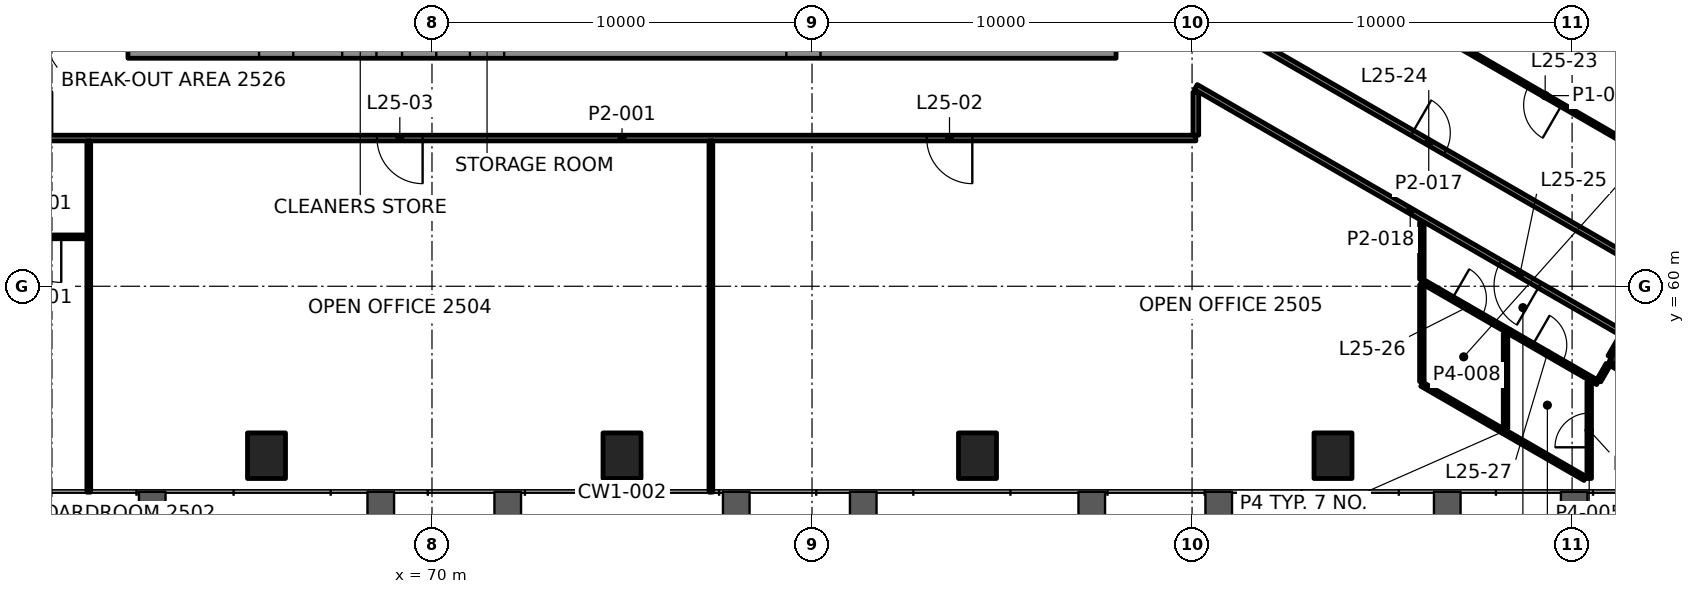
"""IFC4 building model, lengths in metres.
Left out: names, types, materials, properties, quantities, classifications, styles, units other than length and angle.
Written with IfcOpenShell. Run it as: python <this file> out.ifc"""

import sys

from ifc_helpers import new_model, si_unit, direction, frame, frame_2d, origin, origin_2d, place, context, subcontext, project, spatial, rectangle, extrude, element, fill, save


model = new_model("IFC4")
c1 = context("Model", 3, precision=1e-05, world=origin(), true_north=direction((0.0, 1.0)))
c2 = subcontext(c1, "Body", "Model", "MODEL_VIEW")
j1 = project(units=[si_unit("LENGTHUNIT", "METRE"), si_unit("PLANEANGLEUNIT", "RADIAN")], contexts=[c1])
p1 = place(None, origin())
s1 = spatial("IfcSite", under=j1, at=p1, CompositionType="ELEMENT")
p2 = place(p1, origin())
s2 = spatial("IfcBuilding", under=s1, at=p2, CompositionType="ELEMENT")
p3 = place(p2, frame((0.0, 0.0, 111.4)))
s3 = spatial("IfcBuildingStorey", under=s2, at=p3, CompositionType="ELEMENT", Elevation=111.4)
p4 = place(p3, frame((103.304, 58.659, 0.0), z_axis=(0.0, 0.0, 1.0), x_axis=(0.5, 0.866025403784, 0.0)))
e1 = element("IfcColumn", 1, at=p4, inside=s3, PredefinedType="COLUMN", context=c2, shape_type="SweptSolid", body=[
    extrude(rectangle(XDim=3.4, YDim=3.4, at=origin_2d()), origin(), (0.0, 0.0, 1.0), 4.2),
])
for number, where, z_axis, x_axis in (
    (2, (65.646, 55.541, -0.0), (0.0, 0.0, 1.0), (1.0, 0.0, 0.0)),
    (3, (75.0, 55.541, -0.0), (0.0, 0.0, 1.0), (1.0, 0.0, 0.0)),
    (4, (84.354, 55.541, -0.0), (0.0, 0.0, 1.0), (1.0, 0.0, 0.0)),
    (5, (93.708, 55.541, -0.0), (0.0, 0.0, 1.0), (1.0, 0.0, 0.0)),
):
    element("IfcColumn", number, at=place(p3, frame(where, z_axis=z_axis, x_axis=x_axis)), inside=s3, PredefinedType="COLUMN", context=c2, shape_type="SweptSolid", body=[
        extrude(rectangle(XDim=1.0, YDim=1.2, at=origin_2d()), origin(), (0.0, 0.0, 1.0), 4.2),
    ])
p5 = place(p3, frame((62.0, 66.45, 0.0), z_axis=(0.0, 0.0, 1.0), x_axis=(1.0, 0.0, 0.0)))
e6 = element("IfcWall", 6, at=p5, inside=s3, PredefinedType="SHEAR", context=c2, shape_type="SweptSolid", body=[
    extrude(rectangle(XDim=26.0, YDim=0.9, at=frame_2d((13.0, 0.0))), origin(), (0.0, 0.0, 1.0), 4.0),
])
p6 = place(p5, frame((3.45, 0.0, 0.0)))
e7 = element("IfcOpeningElement", 7, at=p6, cuts=e6, PredefinedType="OPENING", context=c2, shape_type="SweptSolid", body=[
    extrude(rectangle(XDim=0.9, YDim=2.1, at=frame_2d((0.45, 1.05))), frame((0.0, 0.46, 0.0), z_axis=(0.0, -1.0, 0.0), x_axis=(1.0, 0.0, 0.0)), (0.0, 0.0, 1.0), 0.92),
])
p7 = place(p5, frame((5.637, 0.0, 0.0)))
e8 = element("IfcOpeningElement", 8, at=p7, cuts=e6, PredefinedType="OPENING", context=c2, shape_type="SweptSolid", body=[
    extrude(rectangle(XDim=0.9, YDim=2.1, at=frame_2d((0.45, 1.05))), frame((0.0, 0.46, 0.0), z_axis=(0.0, -1.0, 0.0), x_axis=(1.0, 0.0, 0.0)), (0.0, 0.0, 1.0), 0.92),
])
p8 = place(p5, frame((7.212, 0.0, 0.0)))
e9 = element("IfcOpeningElement", 9, at=p8, cuts=e6, PredefinedType="OPENING", context=c2, shape_type="SweptSolid", body=[
    extrude(rectangle(XDim=0.9, YDim=2.1, at=frame_2d((0.45, 1.05))), frame((0.0, 0.46, 0.0), z_axis=(0.0, -1.0, 0.0), x_axis=(1.0, 0.0, 0.0)), (0.0, 0.0, 1.0), 0.92),
])
p9 = place(p5, frame((8.999, 0.0, 0.0)))
e10 = element("IfcOpeningElement", 10, at=p9, cuts=e6, PredefinedType="OPENING", context=c2, shape_type="SweptSolid", body=[
    extrude(rectangle(XDim=0.9, YDim=2.1, at=frame_2d((0.45, 1.05))), frame((0.0, 0.46, 0.0), z_axis=(0.0, -1.0, 0.0), x_axis=(1.0, 0.0, 0.0)), (0.0, 0.0, 1.0), 0.92),
])
p10 = place(p5, frame((17.324, 0.0, 0.0)))
e11 = element("IfcOpeningElement", 11, at=p10, cuts=e6, PredefinedType="OPENING", context=c2, shape_type="SweptSolid", body=[
    extrude(rectangle(XDim=0.9, YDim=2.1, at=frame_2d((0.45, 1.05))), frame((0.0, 0.46, 0.0), z_axis=(0.0, -1.0, 0.0), x_axis=(1.0, 0.0, 0.0)), (0.0, 0.0, 1.0), 0.92),
])
p11 = place(p3, frame((60.919, 61.3, 0.0), z_axis=(0.0, 0.0, 1.0), x_axis=(-1.0, 0.0, 0.0)))
e12 = element("IfcWall", 12, at=p11, inside=s3, PredefinedType="PARTITIONING", context=c2, shape_type="SweptSolid", body=[
    extrude(rectangle(XDim=2.548, YDim=0.1, at=frame_2d((1.274, 0.0))), origin(), (0.0, 0.0, 1.0), 3.4),
])
p12 = place(p11, frame((0.674, 0.0, 0.0)))
e13 = element("IfcOpeningElement", 13, at=p12, cuts=e12, PredefinedType="OPENING", context=c2, shape_type="SweptSolid", body=[
    extrude(rectangle(XDim=1.2, YDim=2.1, at=frame_2d((0.6, 1.05))), frame((0.0, 0.06, 0.0), z_axis=(0.0, -1.0, 0.0), x_axis=(1.0, 0.0, 0.0)), (0.0, 0.0, 1.0), 0.12),
])
p13 = place(p3, frame((90.099, 63.9, 0.0), z_axis=(0.0, 0.0, 1.0), x_axis=(-1.0, 0.0, 0.0)))
e14 = element("IfcWall", 14, at=p13, inside=s3, PredefinedType="PARTITIONING", context=c2, shape_type="SweptSolid", body=[
    extrude(rectangle(XDim=30.199, YDim=0.15, at=frame_2d((15.099, 0.0))), origin(), (0.0, 0.0, 1.0), 3.4),
])
p14 = place(p13, frame((5.882, 0.0, 0.0)))
e15 = element("IfcOpeningElement", 15, at=p14, cuts=e14, PredefinedType="OPENING", context=c2, shape_type="SweptSolid", body=[
    extrude(rectangle(XDim=1.2, YDim=2.1, at=frame_2d((0.6, 1.05))), frame((0.0, 0.085, 0.0), z_axis=(0.0, -1.0, 0.0), x_axis=(1.0, 0.0, 0.0)), (0.0, 0.0, 1.0), 0.17),
])
p15 = place(p13, frame((20.346, 0.0, 0.0)))
e16 = element("IfcOpeningElement", 16, at=p15, cuts=e14, PredefinedType="OPENING", context=c2, shape_type="SweptSolid", body=[
    extrude(rectangle(XDim=1.2, YDim=2.1, at=frame_2d((0.6, 1.05))), frame((0.0, 0.085, 0.0), z_axis=(0.0, -1.0, 0.0), x_axis=(1.0, 0.0, 0.0)), (0.0, 0.0, 1.0), 0.17),
])
p16 = place(p3, frame((100.704, 57.516, 0.0), z_axis=(0.0, 0.0, 1.0), x_axis=(0.499679281737, 0.866210491395, 0.0)))
e17 = element("IfcWall", 17, at=p16, inside=s3, PredefinedType="PARTITIONING", context=c2, shape_type="SweptSolid", body=[
    extrude(rectangle(XDim=0.49, YDim=0.12, at=frame_2d((0.245, 0.0))), origin(), (0.0, 0.0, 1.0), 3.4),
])
p17 = place(p3, frame((101.031, 58.124, 0.0), z_axis=(0.0, 0.0, 1.0), x_axis=(0.500049599607, 0.865996765544, 0.0)))
e18 = element("IfcWall", 18, at=p17, inside=s3, PredefinedType="PARTITIONING", context=c2, shape_type="SweptSolid", body=[
    extrude(rectangle(XDim=0.625, YDim=0.2, at=frame_2d((0.312, 0.0))), origin(), (0.0, 0.0, 1.0), 3.4),
])
p18 = place(p3, frame((100.45, 54.941, 0.0), z_axis=(0.0, 0.0, 1.0), x_axis=(0.0, 1.0, 0.0)))
e19 = element("IfcWall", 19, at=p18, inside=s3, PredefinedType="PARTITIONING", context=c2, shape_type="SweptSolid", body=[
    extrude(rectangle(XDim=2.542, YDim=0.12, at=frame_2d((1.271, 0.0))), origin(), (0.0, 0.0, 1.0), 3.4),
])
p19 = place(p18, frame((0.821, 0.0, 0.0)))
e20 = element("IfcOpeningElement", 20, at=p19, cuts=e19, PredefinedType="OPENING", context=c2, shape_type="SweptSolid", body=[
    extrude(rectangle(XDim=0.9, YDim=2.1, at=frame_2d((0.45, 1.05))), frame((0.0, 0.07, 0.0), z_axis=(0.0, -1.0, 0.0), x_axis=(1.0, 0.0, 0.0)), (0.0, 0.0, 1.0), 0.14),
])
p20 = place(p3, frame((98.249, 56.26, 0.0), z_axis=(0.0, 0.0, 1.0), x_axis=(0.0, 1.0, 0.0)))
e21 = element("IfcWall", 21, at=p20, inside=s3, PredefinedType="PARTITIONING", context=c2, shape_type="SweptSolid", body=[
    extrude(rectangle(XDim=2.495, YDim=0.12, at=frame_2d((1.248, 0.0))), origin(), (0.0, 0.0, 1.0), 3.4),
])
p21 = place(p3, frame((96.047, 57.491, 0.0), z_axis=(0.0, 0.0, 1.0), x_axis=(0.0, 1.0, 0.0)))
e22 = element("IfcWall", 22, at=p21, inside=s3, PredefinedType="PARTITIONING", context=c2, shape_type="SweptSolid", body=[
    extrude(rectangle(XDim=2.541, YDim=0.12, at=frame_2d((1.27, 0.0))), origin(), (0.0, 0.0, 1.0), 3.4),
])
p22 = place(p3, frame((90.1, 63.976, 0.0), z_axis=(0.0, 0.0, 1.0), x_axis=(0.0, 1.0, 0.0)))
e23 = element("IfcWall", 23, at=p22, inside=s3, PredefinedType="PARTITIONING", context=c2, shape_type="SweptSolid", body=[
    extrude(rectangle(XDim=1.131, YDim=0.15, at=frame_2d((0.565, 0.0))), origin(), (0.0, 0.0, 1.0), 3.247),
])
for number, where, z_axis, x_axis in (
    (24, (77.339, 54.581, 0.0), (0.0, 0.0, 1.0), (0.0, 1.0, 0.0)),
    (25, (60.969, 54.581, 0.0), (0.0, 0.0, 1.0), (0.0, 1.0, 0.0)),
):
    element("IfcWall", number, at=place(p3, frame(where, z_axis=z_axis, x_axis=x_axis)), inside=s3, PredefinedType="PARTITIONING", context=c2, shape_type="SweptSolid", body=[
        extrude(rectangle(XDim=9.244, YDim=0.1, at=frame_2d((4.622, 0.0))), origin(), (0.0, 0.0, 1.0), 3.165),
    ])
p23 = place(p3, frame((105.833, 61.24, 0.0), z_axis=(0.0, 0.0, 1.0), x_axis=(-0.866025727262, 0.499999439721, 0.0)))
e26 = element("IfcWall", 26, at=p23, inside=s3, PredefinedType="PARTITIONING", context=c2, shape_type="SweptSolid", body=[
    extrude(rectangle(XDim=15.107, YDim=0.1, at=frame_2d((7.553, 0.0))), origin(), (0.0, 0.0, 1.0), 3.4),
])
p24 = place(p23, frame((7.053, 0.0, 0.0)))
e27 = element("IfcOpeningElement", 27, at=p24, cuts=e26, PredefinedType="OPENING", context=c2, shape_type="SweptSolid", body=[
    extrude(rectangle(XDim=1.0, YDim=2.1, at=frame_2d((0.5, 1.05))), frame((0.0, 0.06, 0.0), z_axis=(0.0, -1.0, 0.0), x_axis=(1.0, 0.0, 0.0)), (0.0, 0.0, 1.0), 0.12),
])
p25 = place(p3, frame((90.175, 67.278, 0.0), z_axis=(0.0, 0.0, 1.0), x_axis=(0.866025916507, -0.499999111938, 0.0)))
e28 = element("IfcWall", 28, at=p25, inside=s3, PredefinedType="PARTITIONING", context=c2, shape_type="SweptSolid", body=[
    extrude(rectangle(XDim=13.979, YDim=0.15, at=frame_2d((6.99, 0.0))), origin(), (0.0, 0.0, 1.0), 3.4),
])
p26 = place(p25, frame((6.49, 0.0, 0.0)))
e29 = element("IfcOpeningElement", 29, at=p26, cuts=e28, PredefinedType="OPENING", context=c2, shape_type="SweptSolid", body=[
    extrude(rectangle(XDim=1.0, YDim=2.1, at=frame_2d((0.5, 1.05))), frame((0.0, 0.085, 0.0), z_axis=(0.0, -1.0, 0.0), x_axis=(1.0, 0.0, 0.0)), (0.0, 0.0, 1.0), 0.17),
])
p27 = place(p3, frame((101.382, 58.729, 0.0), z_axis=(0.0, 0.0, 1.0), x_axis=(-0.866023606965, 0.500003112169, 0.0)))
e30 = element("IfcWall", 30, at=p27, inside=s3, PredefinedType="PARTITIONING", context=c2, shape_type="SweptSolid", body=[
    extrude(rectangle(XDim=13.027, YDim=0.15, at=frame_2d((6.513, 0.0))), origin(), (0.0, 0.0, 1.0), 3.247),
])
p28 = place(p27, frame((2.581, 0.0, 0.0)))
e31 = element("IfcOpeningElement", 31, at=p28, cuts=e30, PredefinedType="OPENING", context=c2, shape_type="SweptSolid", body=[
    extrude(rectangle(XDim=1.2, YDim=2.1, at=frame_2d((0.6, 1.05))), frame((0.0, 0.085, 0.0), z_axis=(0.0, -1.0, 0.0), x_axis=(1.0, 0.0, 0.0)), (0.0, 0.0, 1.0), 0.17),
])
p29 = place(p3, frame((104.065, 56.257, 0.0), z_axis=(0.0, 0.0, 1.0), x_axis=(-0.866034141321, 0.499984865837, 0.0)))
e32 = element("IfcWall", 32, at=p29, inside=s3, PredefinedType="PARTITIONING", context=c2, shape_type="SweptSolid", body=[
    extrude(rectangle(XDim=3.543, YDim=0.2, at=frame_2d((1.772, 0.0))), origin(), (0.0, 0.0, 1.0), 3.4),
])
p30 = place(p3, frame((96.047, 60.135, 0.0), z_axis=(0.0, 0.0, 1.0), x_axis=(0.866018138487, -0.500012583653, 0.0)))
e33 = element("IfcWall", 33, at=p30, inside=s3, PredefinedType="PARTITIONING", context=c2, shape_type="SweptSolid", body=[
    extrude(rectangle(XDim=5.342, YDim=0.12, at=frame_2d((2.671, 0.0))), origin(), (0.0, 0.0, 1.0), 3.4),
])
p31 = place(p30, frame((0.923, 0.0, 0.0)))
e34 = element("IfcOpeningElement", 34, at=p31, cuts=e33, PredefinedType="OPENING", context=c2, shape_type="SweptSolid", body=[
    extrude(rectangle(XDim=0.9, YDim=2.1, at=frame_2d((0.45, 1.05))), frame((0.0, 0.07, 0.0), z_axis=(0.0, -1.0, 0.0), x_axis=(1.0, 0.0, 0.0)), (0.0, 0.0, 1.0), 0.14),
])
p32 = place(p30, frame((3.364, 0.0, 0.0)))
e35 = element("IfcOpeningElement", 35, at=p32, cuts=e33, PredefinedType="OPENING", context=c2, shape_type="SweptSolid", body=[
    extrude(rectangle(XDim=0.9, YDim=2.1, at=frame_2d((0.45, 1.05))), frame((0.0, 0.07, 0.0), z_axis=(0.0, -1.0, 0.0), x_axis=(1.0, 0.0, 0.0)), (0.0, 0.0, 1.0), 0.14),
])
p33 = place(p3, frame((100.343, 54.941, 0.0), z_axis=(0.0, 0.0, 1.0), x_axis=(-0.866005271205, 0.500034869029, 0.0)))
e36 = element("IfcWall", 36, at=p33, inside=s3, PredefinedType="PARTITIONING", context=c2, shape_type="SweptSolid", body=[
    extrude(rectangle(XDim=4.961, YDim=0.12, at=frame_2d((2.48, 0.0))), origin(), (0.0, 0.0, 1.0), 3.4),
])
p34 = place(p3, frame((96.047, 60.187, 0.0), z_axis=(0.0, 0.0, 1.0), x_axis=(0.0, 1.0, 0.0)))
e37 = element("IfcWall", 37, at=p34, inside=s3, PredefinedType="PARTITIONING", context=c2, shape_type="SweptSolid", body=[
    extrude(rectangle(XDim=1.496, YDim=0.12, at=frame_2d((0.748, 0.0))), origin(), (0.0, 0.0, 1.0), 3.4),
])
p35 = place(p12, origin())
e38 = element("IfcDoor", 38, at=p35, inside=s3, OperationType="DOUBLE_DOOR_SINGLE_SWING", PredefinedType="DOOR", context=c2, shape_type="SweptSolid", body=[
    extrude(rectangle(XDim=1.2, YDim=2.1, at=frame_2d((0.6, 1.05))), frame((0.0, 0.025, 0.0), z_axis=(0.0, -1.0, 0.0), x_axis=(1.0, 0.0, 0.0)), (0.0, 0.0, 1.0), 0.05),
])
fill(e13, e38)
p36 = place(p14, origin())
e39 = element("IfcDoor", 39, at=p36, inside=s3, OperationType="DOUBLE_DOOR_SINGLE_SWING", PredefinedType="DOOR", context=c2, shape_type="SweptSolid", body=[
    extrude(rectangle(XDim=1.2, YDim=2.1, at=frame_2d((0.6, 1.05))), frame((0.0, 0.025, 0.0), z_axis=(0.0, -1.0, 0.0), x_axis=(1.0, 0.0, 0.0)), (0.0, 0.0, 1.0), 0.05),
])
fill(e15, e39)
p37 = place(p15, origin())
e40 = element("IfcDoor", 40, at=p37, inside=s3, OperationType="DOUBLE_DOOR_SINGLE_SWING", PredefinedType="DOOR", context=c2, shape_type="SweptSolid", body=[
    extrude(rectangle(XDim=1.2, YDim=2.1, at=frame_2d((0.6, 1.05))), frame((0.0, 0.025, 0.0), z_axis=(0.0, -1.0, 0.0), x_axis=(1.0, 0.0, 0.0)), (0.0, 0.0, 1.0), 0.05),
])
fill(e16, e40)
p38 = place(p19, origin())
e41 = element("IfcDoor", 41, at=p38, inside=s3, OperationType="SINGLE_SWING_RIGHT", PredefinedType="DOOR", context=c2, shape_type="SweptSolid", body=[
    extrude(rectangle(XDim=0.9, YDim=2.1, at=frame_2d((0.45, 1.05))), frame((0.0, 0.025, 0.0), z_axis=(0.0, -1.0, 0.0), x_axis=(1.0, 0.0, 0.0)), (0.0, 0.0, 1.0), 0.05),
])
fill(e20, e41)
p39 = place(p24, origin())
e42 = element("IfcDoor", 42, at=p39, inside=s3, OperationType="SINGLE_SWING_LEFT", PredefinedType="DOOR", context=c2, shape_type="SweptSolid", body=[
    extrude(rectangle(XDim=1.0, YDim=2.1, at=frame_2d((0.5, 1.05))), frame((0.0, 0.025, 0.0), z_axis=(0.0, -1.0, 0.0), x_axis=(1.0, 0.0, 0.0)), (0.0, 0.0, 1.0), 0.05),
])
fill(e27, e42)
p40 = place(p26, origin())
e43 = element("IfcDoor", 43, at=p40, inside=s3, OperationType="SINGLE_SWING_LEFT", PredefinedType="DOOR", context=c2, shape_type="SweptSolid", body=[
    extrude(rectangle(XDim=1.0, YDim=2.1, at=frame_2d((0.5, 1.05))), frame((0.0, 0.025, 0.0), z_axis=(0.0, -1.0, 0.0), x_axis=(1.0, 0.0, 0.0)), (0.0, 0.0, 1.0), 0.05),
])
fill(e29, e43)
p41 = place(p28, origin())
e44 = element("IfcDoor", 44, at=p41, inside=s3, OperationType="DOUBLE_DOOR_SINGLE_SWING", PredefinedType="DOOR", context=c2, shape_type="SweptSolid", body=[
    extrude(rectangle(XDim=1.2, YDim=2.1, at=frame_2d((0.6, 1.05))), frame((0.0, 0.025, 0.0), z_axis=(0.0, -1.0, 0.0), x_axis=(1.0, 0.0, 0.0)), (0.0, 0.0, 1.0), 0.05),
])
fill(e31, e44)
p42 = place(p31, origin())
e45 = element("IfcDoor", 45, at=p42, inside=s3, OperationType="SINGLE_SWING_LEFT", PredefinedType="DOOR", context=c2, shape_type="SweptSolid", body=[
    extrude(rectangle(XDim=0.9, YDim=2.1, at=frame_2d((0.45, 1.05))), frame((0.0, 0.025, 0.0), z_axis=(0.0, -1.0, 0.0), x_axis=(1.0, 0.0, 0.0)), (0.0, 0.0, 1.0), 0.05),
])
fill(e34, e45)
p43 = place(p32, origin())
e46 = element("IfcDoor", 46, at=p43, inside=s3, OperationType="SINGLE_SWING_RIGHT", PredefinedType="DOOR", context=c2, shape_type="SweptSolid", body=[
    extrude(rectangle(XDim=0.9, YDim=2.1, at=frame_2d((0.45, 1.05))), frame((0.0, 0.025, 0.0), z_axis=(0.0, -1.0, 0.0), x_axis=(1.0, 0.0, 0.0)), (0.0, 0.0, 1.0), 0.05),
])
fill(e35, e46)
save(model, sys.argv[1])
